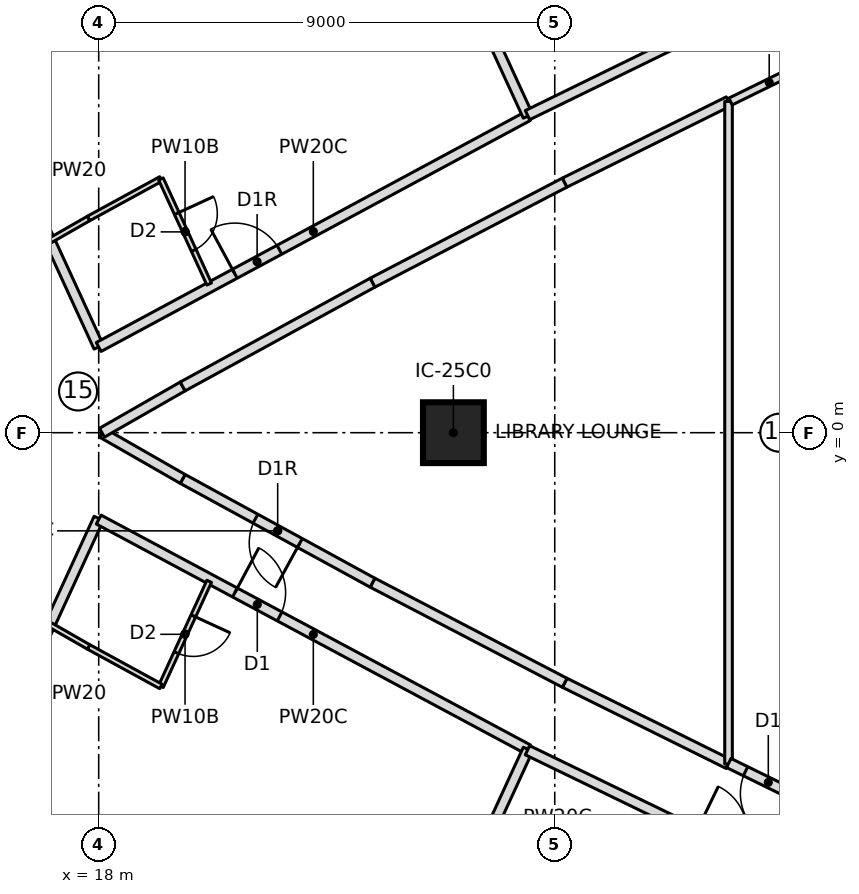
"""IFC4 building model, lengths in metres.
Left out: names, types, materials, properties, quantities, classifications, styles, units other than length and angle.
Written with IfcOpenShell. Run it as: python <this file> out.ifc"""

import sys

from ifc_helpers import new_model, si_unit, direction, frame, frame_2d, origin, origin_2d, place, context, subcontext, project, spatial, rectangle, extrude, element, fill, save


model = new_model("IFC4")
c1 = context("Model", 3, precision=1e-05, world=origin(), true_north=direction((0.0, 1.0)))
c2 = subcontext(c1, "Body", "Model", "MODEL_VIEW")
j1 = project(units=[si_unit("LENGTHUNIT", "METRE"), si_unit("PLANEANGLEUNIT", "RADIAN")], contexts=[c1])
p1 = place(None, origin())
s1 = spatial("IfcSite", under=j1, at=p1, CompositionType="ELEMENT")
p2 = place(p1, origin())
s2 = spatial("IfcBuilding", under=s1, at=p2, CompositionType="ELEMENT")
p3 = place(p2, frame((0.0, 0.0, 92.0)))
s3 = spatial("IfcBuildingStorey", under=s2, at=p3, CompositionType="ELEMENT", Elevation=92.0)
p4 = place(p3, frame((25.0, 0.0, 0.0), z_axis=(0.0, 0.0, 1.0), x_axis=(1.0, 0.0, 0.0)))
e1 = element("IfcColumn", 1, at=p4, inside=s3, PredefinedType="COLUMN", context=c2, shape_type="SweptSolid", body=[
    extrude(rectangle(XDim=1.2, YDim=1.2, at=origin_2d()), origin(), (0.0, 0.0, 1.0), 3.55),
])
p5 = place(p3, frame((14.815, 8.626, 0.0), z_axis=(0.0, 0.0, 1.0), x_axis=(0.417432341259, -0.908708006166, 0.0)))
e2 = element("IfcWall", 2, at=p5, inside=s3, PredefinedType="PARTITIONING", context=c2, shape_type="SweptSolid", body=[
    extrude(rectangle(XDim=7.631, YDim=0.2, at=frame_2d((3.815, 0.0))), origin(), (0.0, 0.0, 1.0), 3.25),
])
p6 = place(p3, frame((18.0, 1.692, 0.0), z_axis=(0.0, 0.0, 1.0), x_axis=(0.880624272242, 0.473815250006, 0.0)))
e3 = element("IfcWall", 3, at=p6, inside=s3, PredefinedType="PARTITIONING", context=c2, shape_type="SweptSolid", body=[
    extrude(rectangle(XDim=9.619, YDim=0.2, at=frame_2d((4.81, 0.0))), origin(), (0.0, 0.0, 1.0), 3.25),
])
p7 = place(p6, frame((3.05, 0.0, 0.0)))
e4 = element("IfcOpeningElement", 4, at=p7, cuts=e3, PredefinedType="OPENING", context=c2, shape_type="SweptSolid", body=[
    extrude(rectangle(XDim=1.0, YDim=2.1, at=frame_2d((0.5, 1.05))), frame((0.0, 0.11, 0.0), z_axis=(0.0, -1.0, 0.0), x_axis=(1.0, 0.0, 0.0)), (0.0, 0.0, 1.0), 0.22),
])
p8 = place(p3, frame((17.036, 3.79, 0.0), z_axis=(0.0, 0.0, 1.0), x_axis=(0.867629162742, 0.497211862248, 0.0)))
e5 = element("IfcWall", 5, at=p8, inside=s3, PredefinedType="PARTITIONING", context=c2, shape_type="SweptSolid", body=[
    extrude(rectangle(XDim=0.882, YDim=0.1, at=frame_2d((0.441, 0.0))), origin(), (0.0, 0.0, 1.0), 3.25),
])
p9 = place(p3, frame((17.801, 4.229, 0.0), z_axis=(0.0, 0.0, 1.0), x_axis=(0.877424481957, 0.479714788663, 0.0)))
e6 = element("IfcWall", 6, at=p9, inside=s3, PredefinedType="PARTITIONING", context=c2, shape_type="SweptSolid", body=[
    extrude(rectangle(XDim=1.625, YDim=0.1, at=frame_2d((0.813, 0.0))), origin(), (0.0, 0.0, 1.0), 3.25),
])
p10 = place(p3, frame((19.228, 5.008, 0.0), z_axis=(0.0, 0.0, 1.0), x_axis=(0.417450047292, -0.908699872354, 0.0)))
e7 = element("IfcWall", 7, at=p10, inside=s3, PredefinedType="PARTITIONING", context=c2, shape_type="SweptSolid", body=[
    extrude(rectangle(XDim=2.283, YDim=0.1, at=frame_2d((1.141, 0.0))), origin(), (0.0, 0.0, 1.0), 3.25),
])
p11 = place(p10, frame((0.75, 0.0, 0.0)))
e8 = element("IfcOpeningElement", 8, at=p11, cuts=e7, PredefinedType="OPENING", context=c2, shape_type="SweptSolid", body=[
    extrude(rectangle(XDim=0.8, YDim=2.1, at=frame_2d((0.4, 1.05))), frame((0.0, 0.06, 0.0), z_axis=(0.0, -1.0, 0.0), x_axis=(1.0, 0.0, 0.0)), (0.0, 0.0, 1.0), 0.12),
])
p12 = place(p3, frame((26.471, 6.249, 0.0), z_axis=(0.0, 0.0, 1.0), x_axis=(-0.417432822903, 0.908707784914, 0.0)))
e9 = element("IfcWall", 9, at=p12, inside=s3, PredefinedType="PARTITIONING", context=c2, shape_type="SweptSolid", body=[
    extrude(rectangle(XDim=7.604, YDim=0.2, at=frame_2d((3.802, 0.0))), origin(), (0.0, 0.0, 1.0), 3.25),
])
p13 = place(p3, frame((32.0, 8.973, 0.0), z_axis=(0.0, 0.0, 1.0), x_axis=(-0.898493398172, -0.438987031062, 0.0)))
e10 = element("IfcWall", 10, at=p13, inside=s3, PredefinedType="PARTITIONING", context=c2, shape_type="SweptSolid", body=[
    extrude(rectangle(XDim=6.163, YDim=0.2, at=frame_2d((3.082, 0.0))), origin(), (0.0, 0.0, 1.0), 3.25),
])
p14 = place(p13, frame((0.35, 0.0, 0.0)))
e11 = element("IfcOpeningElement", 11, at=p14, cuts=e10, PredefinedType="OPENING", context=c2, shape_type="SweptSolid", body=[
    extrude(rectangle(XDim=1.0, YDim=2.1, at=frame_2d((0.5, 1.05))), frame((0.0, 0.11, 0.0), z_axis=(0.0, -1.0, 0.0), x_axis=(1.0, 0.0, 0.0)), (0.0, 0.0, 1.0), 0.22),
])
p15 = place(p3, frame((14.815, -8.626, 0.0), z_axis=(0.0, 0.0, 1.0), x_axis=(0.417432341259, 0.908708006166, 0.0)))
e12 = element("IfcWall", 12, at=p15, inside=s3, PredefinedType="PARTITIONING", context=c2, shape_type="SweptSolid", body=[
    extrude(rectangle(XDim=7.631, YDim=0.2, at=frame_2d((3.815, 0.0))), origin(), (0.0, 0.0, 1.0), 3.25),
])
p16 = place(p3, frame((18.0, -1.715, 0.0), z_axis=(0.0, 0.0, 1.0), x_axis=(0.881618942915, -0.471961904706, 0.0)))
e13 = element("IfcWall", 13, at=p16, inside=s3, PredefinedType="PARTITIONING", context=c2, shape_type="SweptSolid", body=[
    extrude(rectangle(XDim=9.608, YDim=0.2, at=frame_2d((4.804, 0.0))), origin(), (0.0, 0.0, 1.0), 3.25),
])
p17 = place(p16, frame((3.05, 0.0, 0.0)))
e14 = element("IfcOpeningElement", 14, at=p17, cuts=e13, PredefinedType="OPENING", context=c2, shape_type="SweptSolid", body=[
    extrude(rectangle(XDim=1.0, YDim=2.1, at=frame_2d((0.5, 1.05))), frame((0.0, 0.11, 0.0), z_axis=(0.0, -1.0, 0.0), x_axis=(1.0, 0.0, 0.0)), (0.0, 0.0, 1.0), 0.22),
])
p18 = place(p3, frame((20.18, -2.934, 0.0), z_axis=(0.0, 0.0, 1.0), x_axis=(-0.417450047292, -0.908699872354, 0.0)))
e15 = element("IfcWall", 15, at=p18, inside=s3, PredefinedType="PARTITIONING", context=c2, shape_type="SweptSolid", body=[
    extrude(rectangle(XDim=2.283, YDim=0.1, at=frame_2d((1.141, 0.0))), origin(), (0.0, 0.0, 1.0), 3.25),
])
p19 = place(p18, frame((0.75, 0.0, 0.0)))
e16 = element("IfcOpeningElement", 16, at=p19, cuts=e15, PredefinedType="OPENING", context=c2, shape_type="SweptSolid", body=[
    extrude(rectangle(XDim=0.8, YDim=2.1, at=frame_2d((0.4, 1.05))), frame((0.0, 0.06, 0.0), z_axis=(0.0, -1.0, 0.0), x_axis=(1.0, 0.0, 0.0)), (0.0, 0.0, 1.0), 0.12),
])
p20 = place(p3, frame((19.228, -5.008, 0.0), z_axis=(0.0, 0.0, 1.0), x_axis=(-0.877424481957, 0.479714788663, 0.0)))
e17 = element("IfcWall", 17, at=p20, inside=s3, PredefinedType="PARTITIONING", context=c2, shape_type="SweptSolid", body=[
    extrude(rectangle(XDim=1.625, YDim=0.1, at=frame_2d((0.813, 0.0))), origin(), (0.0, 0.0, 1.0), 3.25),
])
p21 = place(p3, frame((17.801, -4.229, 0.0), z_axis=(0.0, 0.0, 1.0), x_axis=(-0.867629162742, 0.497211862248, 0.0)))
e18 = element("IfcWall", 18, at=p21, inside=s3, PredefinedType="PARTITIONING", context=c2, shape_type="SweptSolid", body=[
    extrude(rectangle(XDim=0.882, YDim=0.1, at=frame_2d((0.441, 0.0))), origin(), (0.0, 0.0, 1.0), 3.25),
])
p22 = place(p3, frame((23.296, -13.159, 0.0), z_axis=(0.0, 0.0, 1.0), x_axis=(0.417432822903, 0.908707784914, 0.0)))
e19 = element("IfcWall", 19, at=p22, inside=s3, PredefinedType="PARTITIONING", context=c2, shape_type="SweptSolid", body=[
    extrude(rectangle(XDim=7.604, YDim=0.2, at=frame_2d((3.802, 0.0))), origin(), (0.0, 0.0, 1.0), 3.25),
])
p23 = place(p3, frame((26.462, -6.267, 0.0), z_axis=(0.0, 0.0, 1.0), x_axis=(0.899897156619, -0.436102175538, 0.0)))
e20 = element("IfcWall", 20, at=p23, inside=s3, PredefinedType="PARTITIONING", context=c2, shape_type="SweptSolid", body=[
    extrude(rectangle(XDim=6.154, YDim=0.2, at=frame_2d((3.077, 0.0))), origin(), (0.0, 0.0, 1.0), 3.25),
])
p24 = place(p23, frame((3.7, 0.0, 0.0)))
e21 = element("IfcOpeningElement", 21, at=p24, cuts=e20, PredefinedType="OPENING", context=c2, shape_type="SweptSolid", body=[
    extrude(rectangle(XDim=1.0, YDim=2.1, at=frame_2d((0.5, 1.05))), frame((0.0, 0.11, 0.0), z_axis=(0.0, -1.0, 0.0), x_axis=(1.0, 0.0, 0.0)), (0.0, 0.0, 1.0), 0.22),
])
p25 = place(p3, frame((23.407, -2.962, 0.0), z_axis=(0.0, 0.0, 1.0), x_axis=(-0.877465075585, 0.479640533242, 0.0)))
e22 = element("IfcWall", 22, at=p25, inside=s3, PredefinedType="PARTITIONING", context=c2, shape_type="SweptSolid", body=[
    extrude(rectangle(XDim=4.273, YDim=0.2, at=frame_2d((2.137, 0.0))), origin(), (0.0, 0.0, 1.0), 3.25),
])
p26 = place(p25, frame((1.636, 0.0, 0.0)))
e23 = element("IfcOpeningElement", 23, at=p26, cuts=e22, PredefinedType="OPENING", context=c2, shape_type="SweptSolid", body=[
    extrude(rectangle(XDim=1.0, YDim=2.1, at=frame_2d((0.5, 1.05))), frame((0.0, 0.11, 0.0), z_axis=(0.0, -1.0, 0.0), x_axis=(1.0, 0.0, 0.0)), (0.0, 0.0, 1.0), 0.22),
])
p27 = place(p3, frame((30.43, -6.539, 0.0), z_axis=(0.0, 0.0, 1.0), x_axis=(-0.895964304417, 0.44412606905, 0.0)))
e24 = element("IfcWall", 24, at=p27, inside=s3, PredefinedType="PARTITIONING", context=c2, shape_type="SweptSolid", body=[
    extrude(rectangle(XDim=3.609, YDim=0.2, at=frame_2d((1.804, 0.0))), origin(), (0.0, 0.0, 1.0), 3.25),
])
p28 = place(p3, frame((27.196, -4.936, 0.0), z_axis=(0.0, 0.0, 1.0), x_axis=(-0.886899452904, 0.461962509775, 0.0)))
e25 = element("IfcWall", 25, at=p28, inside=s3, PredefinedType="PARTITIONING", context=c2, shape_type="SweptSolid", body=[
    extrude(rectangle(XDim=4.273, YDim=0.2, at=frame_2d((2.136, 0.0))), origin(), (0.0, 0.0, 1.0), 3.25),
])
for number, where, z_axis, x_axis in (
    (26, (19.657, -0.912, 0.0), (0.0, 0.0, 1.0), (-0.868, 0.497, 0.0)),
    (27, (18.065, 0.0, 0.0), (0.0, 0.0, 1.0), (0.868, 0.497, 0.0)),
):
    element("IfcWall", number, at=place(p3, frame(where, z_axis=z_axis, x_axis=x_axis)), inside=s3, PredefinedType="PARTITIONING", context=c2, shape_type="SweptSolid", body=[
        extrude(rectangle(XDim=1.835, YDim=0.2, at=frame_2d((0.918, 0.0))), origin(), (0.0, 0.0, 1.0), 3.25),
    ])
p29 = place(p3, frame((19.657, 0.912, 0.0), z_axis=(0.0, 0.0, 1.0), x_axis=(0.877465075585, 0.479640533242, 0.0)))
e28 = element("IfcWall", 28, at=p29, inside=s3, PredefinedType="PARTITIONING", context=c2, shape_type="SweptSolid", body=[
    extrude(rectangle(XDim=4.273, YDim=0.2, at=frame_2d((2.137, 0.0))), origin(), (0.0, 0.0, 1.0), 3.25),
])
p30 = place(p3, frame((23.407, 2.962, 0.0), z_axis=(0.0, 0.0, 1.0), x_axis=(0.886899452904, 0.461962509775, 0.0)))
e29 = element("IfcWall", 29, at=p30, inside=s3, PredefinedType="PARTITIONING", context=c2, shape_type="SweptSolid", body=[
    extrude(rectangle(XDim=4.273, YDim=0.2, at=frame_2d((2.136, 0.0))), origin(), (0.0, 0.0, 1.0), 3.25),
])
p31 = place(p3, frame((27.196, 4.936, 0.0), z_axis=(0.0, 0.0, 1.0), x_axis=(0.895964304417, 0.44412606905, 0.0)))
e30 = element("IfcWall", 30, at=p31, inside=s3, PredefinedType="PARTITIONING", context=c2, shape_type="SweptSolid", body=[
    extrude(rectangle(XDim=3.609, YDim=0.2, at=frame_2d((1.804, 0.0))), origin(), (0.0, 0.0, 1.0), 3.25),
])
p32 = place(p3, frame((30.43, -6.539, 0.0), z_axis=(0.0, 0.0, 1.0), x_axis=(0.0, 1.0, 0.0)))
e31 = element("IfcWall", 31, at=p32, inside=s3, PredefinedType="PARTITIONING", context=c2, shape_type="SweptSolid", body=[
    extrude(rectangle(XDim=13.077, YDim=0.15, at=frame_2d((6.539, 0.0))), origin(), (0.0, 0.0, 1.0), 3.25),
])
p33 = place(p3, frame((31.995, -7.285, 0.0), z_axis=(0.0, 0.0, 1.0), x_axis=(-0.897771601508, 0.440461294015, 0.0)))
e32 = element("IfcWall", 32, at=p33, inside=s3, PredefinedType="PARTITIONING", context=c2, shape_type="SweptSolid", body=[
    extrude(rectangle(XDim=1.739, YDim=0.2, at=frame_2d((0.869, 0.0))), origin(), (0.0, 0.0, 1.0), 3.25),
])
p34 = place(p33, frame((0.369, 0.0, 0.0)))
e33 = element("IfcOpeningElement", 33, at=p34, cuts=e32, PredefinedType="OPENING", context=c2, shape_type="SweptSolid", body=[
    extrude(rectangle(XDim=1.0, YDim=2.1, at=frame_2d((0.5, 1.05))), frame((0.0, 0.11, 0.0), z_axis=(0.0, -1.0, 0.0), x_axis=(1.0, 0.0, 0.0)), (0.0, 0.0, 1.0), 0.22),
])
p35 = place(p3, frame((30.47, 6.536, 0.0), z_axis=(0.0, 0.0, 1.0), x_axis=(0.897735805555, 0.440534247732, 0.0)))
e34 = element("IfcWall", 34, at=p35, inside=s3, PredefinedType="PARTITIONING", context=c2, shape_type="SweptSolid", body=[
    extrude(rectangle(XDim=1.699, YDim=0.15, at=frame_2d((0.85, 0.0))), origin(), (0.0, 0.0, 1.0), 3.25),
])
p36 = place(p11, origin())
e35 = element("IfcDoor", 35, at=p36, inside=s3, OperationType="SINGLE_SWING_LEFT", PredefinedType="DOOR", context=c2, shape_type="SweptSolid", body=[
    extrude(rectangle(XDim=0.8, YDim=2.1, at=frame_2d((0.4, 1.05))), frame((0.0, 0.025, 0.0), z_axis=(0.0, -1.0, 0.0), x_axis=(1.0, 0.0, 0.0)), (0.0, 0.0, 1.0), 0.05),
])
fill(e8, e35)
p37 = place(p7, origin())
e36 = element("IfcDoor", 36, at=p37, inside=s3, OperationType="SINGLE_SWING_RIGHT", PredefinedType="DOOR", context=c2, shape_type="SweptSolid", body=[
    extrude(rectangle(XDim=1.0, YDim=2.1, at=frame_2d((0.5, 1.05))), frame((0.0, 0.025, 0.0), z_axis=(0.0, -1.0, 0.0), x_axis=(1.0, 0.0, 0.0)), (0.0, 0.0, 1.0), 0.05),
])
fill(e4, e36)
p38 = place(p19, origin())
e37 = element("IfcDoor", 37, at=p38, inside=s3, OperationType="SINGLE_SWING_LEFT", PredefinedType="DOOR", context=c2, shape_type="SweptSolid", body=[
    extrude(rectangle(XDim=0.8, YDim=2.1, at=frame_2d((0.4, 1.05))), frame((0.0, 0.025, 0.0), z_axis=(0.0, -1.0, 0.0), x_axis=(1.0, 0.0, 0.0)), (0.0, 0.0, 1.0), 0.05),
])
fill(e16, e37)
p39 = place(p17, origin())
e38 = element("IfcDoor", 38, at=p39, inside=s3, OperationType="SINGLE_SWING_LEFT", PredefinedType="DOOR", context=c2, shape_type="SweptSolid", body=[
    extrude(rectangle(XDim=1.0, YDim=2.1, at=frame_2d((0.5, 1.05))), frame((0.0, 0.025, 0.0), z_axis=(0.0, -1.0, 0.0), x_axis=(1.0, 0.0, 0.0)), (0.0, 0.0, 1.0), 0.05),
])
fill(e14, e38)
p40 = place(p26, origin())
e39 = element("IfcDoor", 39, at=p40, inside=s3, OperationType="SINGLE_SWING_RIGHT", PredefinedType="DOOR", context=c2, shape_type="SweptSolid", body=[
    extrude(rectangle(XDim=1.0, YDim=2.1, at=frame_2d((0.5, 1.05))), frame((0.0, 0.025, 0.0), z_axis=(0.0, -1.0, 0.0), x_axis=(1.0, 0.0, 0.0)), (0.0, 0.0, 1.0), 0.05),
])
fill(e23, e39)
p41 = place(p34, origin())
e40 = element("IfcDoor", 40, at=p41, inside=s3, OperationType="SINGLE_SWING_LEFT", PredefinedType="DOOR", context=c2, shape_type="SweptSolid", body=[
    extrude(rectangle(XDim=1.0, YDim=2.1, at=frame_2d((0.5, 1.05))), frame((0.0, 0.025, 0.0), z_axis=(0.0, -1.0, 0.0), x_axis=(1.0, 0.0, 0.0)), (0.0, 0.0, 1.0), 0.05),
])
fill(e33, e40)
save(model, sys.argv[1])
